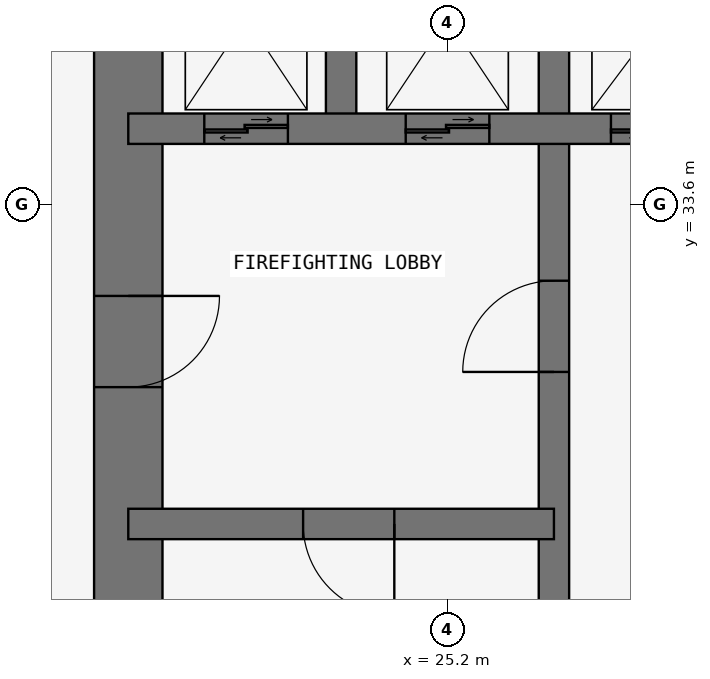
"""IFC4 building model, lengths in metres.
Left out: names, types, materials, properties, quantities, classifications, styles, units other than length and angle.
Written with IfcOpenShell. Run it as: python <this file> out.ifc"""

import sys

from ifc_helpers import new_model, si_unit, direction, frame, frame_2d, origin, place, context, subcontext, project, spatial, rectangle, extrude, element, fill, save


model = new_model("IFC4")
c1 = context("Model", 3, precision=1e-05, world=origin(), true_north=direction((0.0, 1.0)))
c2 = subcontext(c1, "Body", "Model", "MODEL_VIEW")
j1 = project(units=[si_unit("LENGTHUNIT", "METRE"), si_unit("PLANEANGLEUNIT", "RADIAN")], contexts=[c1])
p1 = place(None, origin())
s1 = spatial("IfcSite", under=j1, at=p1, CompositionType="ELEMENT")
p2 = place(p1, origin())
s2 = spatial("IfcBuilding", under=s1, at=p2, CompositionType="ELEMENT")
p3 = place(p2, frame((0.0, 0.0, 116.1)))
s3 = spatial("IfcBuildingStorey", under=s2, at=p3, CompositionType="ELEMENT", Elevation=116.1)
p4 = place(p3, frame((21.0, 37.8, 0.0), z_axis=(0.0, 0.0, 1.0), x_axis=(0.0, -1.0, 0.0)))
e1 = element("IfcWall", 1, at=p4, inside=s3, PredefinedType="SHEAR", context=c2, shape_type="SweptSolid", body=[
    extrude(rectangle(XDim=17.25, YDim=0.9, at=frame_2d((8.625, 0.0))), origin(), (0.0, 0.0, 1.0), 3.6),
])
p5 = place(p4, frame((5.4, 0.0, 0.0)))
e2 = element("IfcOpeningElement", 2, at=p5, cuts=e1, PredefinedType="OPENING", context=c2, shape_type="SweptSolid", body=[
    extrude(rectangle(XDim=1.2, YDim=2.1, at=frame_2d((0.6, 1.05))), frame((0.0, 0.46, 0.0), z_axis=(0.0, -1.0, 0.0), x_axis=(1.0, 0.0, 0.0)), (0.0, 0.0, 1.0), 0.92),
])
p6 = place(p3, frame((26.6, 21.0, 0.0), z_axis=(0.0, 0.0, 1.0), x_axis=(0.0, 1.0, 0.0)))
e3 = element("IfcWall", 3, at=p6, inside=s3, PredefinedType="SHEAR", context=c2, shape_type="SweptSolid", body=[
    extrude(rectangle(XDim=16.8, YDim=0.4, at=frame_2d((8.4, 0.0))), origin(), (0.0, 0.0, 1.0), 3.6),
])
p7 = place(p6, frame((10.4, 0.0, 0.0)))
e4 = element("IfcOpeningElement", 4, at=p7, cuts=e3, PredefinedType="OPENING", context=c2, shape_type="SweptSolid", body=[
    extrude(rectangle(XDim=1.2, YDim=2.1, at=frame_2d((0.6, 1.05))), frame((0.0, 0.21, 0.0), z_axis=(0.0, -1.0, 0.0), x_axis=(1.0, 0.0, 0.0)), (0.0, 0.0, 1.0), 0.42),
])
p8 = place(p3, frame((21.0, 29.4, 0.0), z_axis=(0.0, 0.0, 1.0), x_axis=(1.0, 0.0, 0.0)))
e5 = element("IfcWall", 5, at=p8, inside=s3, PredefinedType="SHEAR", context=c2, shape_type="SweptSolid", body=[
    extrude(rectangle(XDim=5.6, YDim=0.4, at=frame_2d((2.8, 0.0))), origin(), (0.0, 0.0, 1.0), 3.6),
])
p9 = place(p8, frame((2.3, 0.0, 0.0)))
e6 = element("IfcOpeningElement", 6, at=p9, cuts=e5, PredefinedType="OPENING", context=c2, shape_type="SweptSolid", body=[
    extrude(rectangle(XDim=1.2, YDim=2.1, at=frame_2d((0.6, 1.05))), frame((0.0, 0.21, 0.0), z_axis=(0.0, -1.0, 0.0), x_axis=(1.0, 0.0, 0.0)), (0.0, 0.0, 1.0), 0.42),
])
p10 = place(p3, frame((21.0, 34.6, 0.0), z_axis=(0.0, 0.0, 1.0), x_axis=(1.0, 0.0, 0.0)))
e7 = element("IfcWall", 7, at=p10, inside=s3, PredefinedType="SHEAR", context=c2, shape_type="SweptSolid", body=[
    extrude(rectangle(XDim=11.2, YDim=0.4, at=frame_2d((5.6, 0.0))), origin(), (0.0, 0.0, 1.0), 3.6),
])
p11 = place(p10, frame((9.35, 0.0, 0.0)))
e8 = element("IfcOpeningElement", 8, at=p11, cuts=e7, PredefinedType="OPENING", context=c2, shape_type="SweptSolid", body=[
    extrude(rectangle(XDim=0.9, YDim=2.1, at=frame_2d((0.45, 1.05))), frame((0.0, 0.21, 0.0), z_axis=(0.0, -1.0, 0.0), x_axis=(1.0, 0.0, 0.0)), (0.0, 0.0, 1.0), 0.42),
])
p12 = place(p10, frame((1.0, 0.0, 0.0)))
e9 = element("IfcOpeningElement", 9, at=p12, cuts=e7, PredefinedType="OPENING", context=c2, shape_type="SweptSolid", body=[
    extrude(rectangle(XDim=1.1, YDim=2.1, at=frame_2d((0.55, 1.05))), frame((0.0, 0.21, 0.0), z_axis=(0.0, -1.0, 0.0), x_axis=(1.0, 0.0, 0.0)), (0.0, 0.0, 1.0), 0.42),
])
p13 = place(p10, frame((3.65, 0.0, 0.0)))
e10 = element("IfcOpeningElement", 10, at=p13, cuts=e7, PredefinedType="OPENING", context=c2, shape_type="SweptSolid", body=[
    extrude(rectangle(XDim=1.1, YDim=2.1, at=frame_2d((0.55, 1.05))), frame((0.0, 0.21, 0.0), z_axis=(0.0, -1.0, 0.0), x_axis=(1.0, 0.0, 0.0)), (0.0, 0.0, 1.0), 0.42),
])
p14 = place(p10, frame((6.35, 0.0, 0.0)))
e11 = element("IfcOpeningElement", 11, at=p14, cuts=e7, PredefinedType="OPENING", context=c2, shape_type="SweptSolid", body=[
    extrude(rectangle(XDim=1.3, YDim=2.1, at=frame_2d((0.65, 1.05))), frame((0.0, 0.21, 0.0), z_axis=(0.0, -1.0, 0.0), x_axis=(1.0, 0.0, 0.0)), (0.0, 0.0, 1.0), 0.42),
])
p15 = place(p3, frame((23.8, 34.6, 0.0), z_axis=(0.0, 0.0, 1.0), x_axis=(0.0, 1.0, 0.0)))
e12 = element("IfcWall", 12, at=p15, inside=s3, PredefinedType="SHEAR", context=c2, shape_type="SweptSolid", body=[
    extrude(rectangle(XDim=3.2, YDim=0.4, at=frame_2d((1.6, 0.0))), origin(), (0.0, 0.0, 1.0), 3.6),
])
p16 = place(p5, origin())
e13 = element("IfcDoor", 13, at=p16, inside=s3, OperationType="SINGLE_SWING_LEFT", PredefinedType="DOOR", context=c2, shape_type="SweptSolid", body=[
    extrude(rectangle(XDim=1.2, YDim=2.1, at=frame_2d((0.6, 1.05))), frame((0.0, 0.025, 0.0), z_axis=(0.0, -1.0, 0.0), x_axis=(1.0, 0.0, 0.0)), (0.0, 0.0, 1.0), 0.05),
])
fill(e2, e13)
p17 = place(p9, frame((1.2, 0.0, 0.0), z_axis=(0.0, 0.0, 1.0), x_axis=(-1.0, 0.0, 0.0)))
e14 = element("IfcDoor", 14, at=p17, inside=s3, OperationType="SINGLE_SWING_LEFT", PredefinedType="DOOR", context=c2, shape_type="SweptSolid", body=[
    extrude(rectangle(XDim=1.2, YDim=2.1, at=frame_2d((0.6, 1.05))), frame((0.0, 0.025, 0.0), z_axis=(0.0, -1.0, 0.0), x_axis=(1.0, 0.0, 0.0)), (0.0, 0.0, 1.0), 0.05),
])
fill(e6, e14)
p18 = place(p7, origin())
e15 = element("IfcDoor", 15, at=p18, inside=s3, OperationType="SINGLE_SWING_LEFT", PredefinedType="DOOR", context=c2, shape_type="SweptSolid", body=[
    extrude(rectangle(XDim=1.2, YDim=2.1, at=frame_2d((0.6, 1.05))), frame((0.0, 0.025, 0.0), z_axis=(0.0, -1.0, 0.0), x_axis=(1.0, 0.0, 0.0)), (0.0, 0.0, 1.0), 0.05),
])
fill(e4, e15)
p19 = place(p12, origin())
e16 = element("IfcDoor", 16, at=p19, inside=s3, OperationType="DOUBLE_DOOR_SLIDING", PredefinedType="DOOR", context=c2, shape_type="SweptSolid", body=[
    extrude(rectangle(XDim=1.1, YDim=2.1, at=frame_2d((0.55, 1.05))), frame((0.0, 0.025, 0.0), z_axis=(0.0, -1.0, 0.0), x_axis=(1.0, 0.0, 0.0)), (0.0, 0.0, 1.0), 0.05),
])
fill(e9, e16)
p20 = place(p13, origin())
e17 = element("IfcDoor", 17, at=p20, inside=s3, OperationType="DOUBLE_DOOR_SLIDING", PredefinedType="DOOR", context=c2, shape_type="SweptSolid", body=[
    extrude(rectangle(XDim=1.1, YDim=2.1, at=frame_2d((0.55, 1.05))), frame((0.0, 0.025, 0.0), z_axis=(0.0, -1.0, 0.0), x_axis=(1.0, 0.0, 0.0)), (0.0, 0.0, 1.0), 0.05),
])
fill(e10, e17)
p21 = place(p14, origin())
e18 = element("IfcDoor", 18, at=p21, inside=s3, OperationType="DOUBLE_DOOR_SLIDING", PredefinedType="DOOR", context=c2, shape_type="SweptSolid", body=[
    extrude(rectangle(XDim=1.3, YDim=2.1, at=frame_2d((0.65, 1.05))), frame((0.0, 0.025, 0.0), z_axis=(0.0, -1.0, 0.0), x_axis=(1.0, 0.0, 0.0)), (0.0, 0.0, 1.0), 0.05),
])
fill(e11, e18)
save(model, sys.argv[1])
